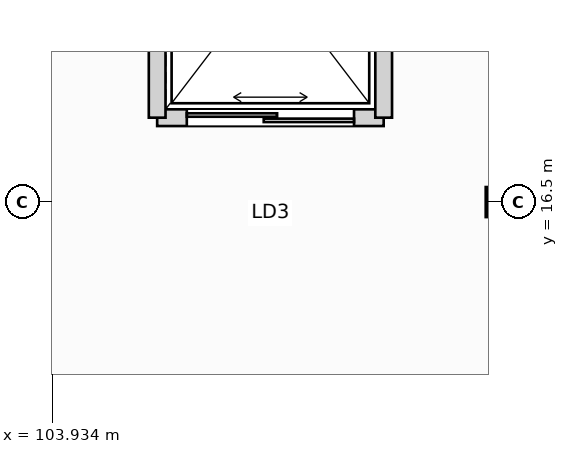
"""IFC4 building model, lengths in metres.
Left out: names, types, materials, properties, quantities, classifications, styles, units other than length and angle.
Written with IfcOpenShell. Run it as: python <this file> out.ifc"""

import sys

from ifc_helpers import new_model, si_unit, direction, frame, frame_2d, origin, origin_2d, place, context, subcontext, project, spatial, rectangle, i_section, extrude, element, fill, save


model = new_model("IFC4")
c1 = context("Model", 3, precision=1e-05, world=origin(), true_north=direction((0.0, 1.0)))
c2 = subcontext(c1, "Body", "Model", "MODEL_VIEW")
j1 = project(units=[si_unit("LENGTHUNIT", "METRE"), si_unit("PLANEANGLEUNIT", "RADIAN")], contexts=[c1])
p1 = place(None, origin())
s1 = spatial("IfcSite", under=j1, at=p1, CompositionType="ELEMENT")
p2 = place(p1, origin())
s2 = spatial("IfcBuilding", under=s1, at=p2, CompositionType="ELEMENT")
p3 = place(p2, frame((0.0, 0.0, 11.4)))
s3 = spatial("IfcBuildingStorey", under=s2, at=p3, CompositionType="ELEMENT", Elevation=11.4)
p4 = place(p3, frame((109.8, 16.5, 0.0), z_axis=(0.0, 0.0, 1.0), x_axis=(1.0, 0.0, 0.0)))
e1 = element("IfcColumn", 1, at=p4, inside=s3, PredefinedType="COLUMN", context=c2, shape_type="SweptSolid", body=[
    extrude(i_section(OverallWidth=0.3, OverallDepth=0.36, WebThickness=0.012, FlangeThickness=0.022, at=origin_2d()), origin(), (0.0, 0.0, 1.0), 5.4),
])
p5 = place(p3, frame((105.31, 17.61, 0.0), z_axis=(0.0, 0.0, 1.0), x_axis=(1.0, 0.0, 0.0)))
e2 = element("IfcWall", 2, at=p5, inside=s3, PredefinedType="PARTITIONING", context=c2, shape_type="SweptSolid", body=[
    extrude(rectangle(XDim=2.98, YDim=0.22, at=frame_2d((1.49, 0.0))), origin(), (0.0, 0.0, 1.0), 5.085),
])
p6 = place(p5, frame((0.39, 0.0, 0.0)))
e3 = element("IfcOpeningElement", 3, at=p6, cuts=e2, PredefinedType="OPENING", context=c2, shape_type="SweptSolid", body=[
    extrude(rectangle(XDim=2.2, YDim=2.5, at=frame_2d((1.1, 1.25))), frame((0.0, 0.12, 0.0), z_axis=(0.0, -1.0, 0.0), x_axis=(1.0, 0.0, 0.0)), (0.0, 0.0, 1.0), 0.24),
])
for number, where, z_axis, x_axis in (
    (4, (105.31, 17.61, 0.0), (0.0, 0.0, 1.0), (0.0, 1.0, 0.0)),
    (5, (108.29, 17.61, 0.0), (0.0, 0.0, 1.0), (0.0, 1.0, 0.0)),
):
    element("IfcWall", number, at=place(p3, frame(where, z_axis=z_axis, x_axis=x_axis)), inside=s3, PredefinedType="PARTITIONING", context=c2, shape_type="SweptSolid", body=[
        extrude(rectangle(XDim=3.78, YDim=0.22, at=frame_2d((1.89, 0.0))), origin(), (0.0, 0.0, 1.0), 5.085),
    ])
p7 = place(p6, origin())
e6 = element("IfcDoor", 6, at=p7, inside=s3, OperationType="DOUBLE_DOOR_SLIDING", PredefinedType="DOOR", context=c2, shape_type="SweptSolid", body=[
    extrude(rectangle(XDim=2.2, YDim=2.5, at=frame_2d((1.1, 1.25))), frame((0.0, 0.025, 0.0), z_axis=(0.0, -1.0, 0.0), x_axis=(1.0, 0.0, 0.0)), (0.0, 0.0, 1.0), 0.05),
])
fill(e3, e6)
save(model, sys.argv[1])
